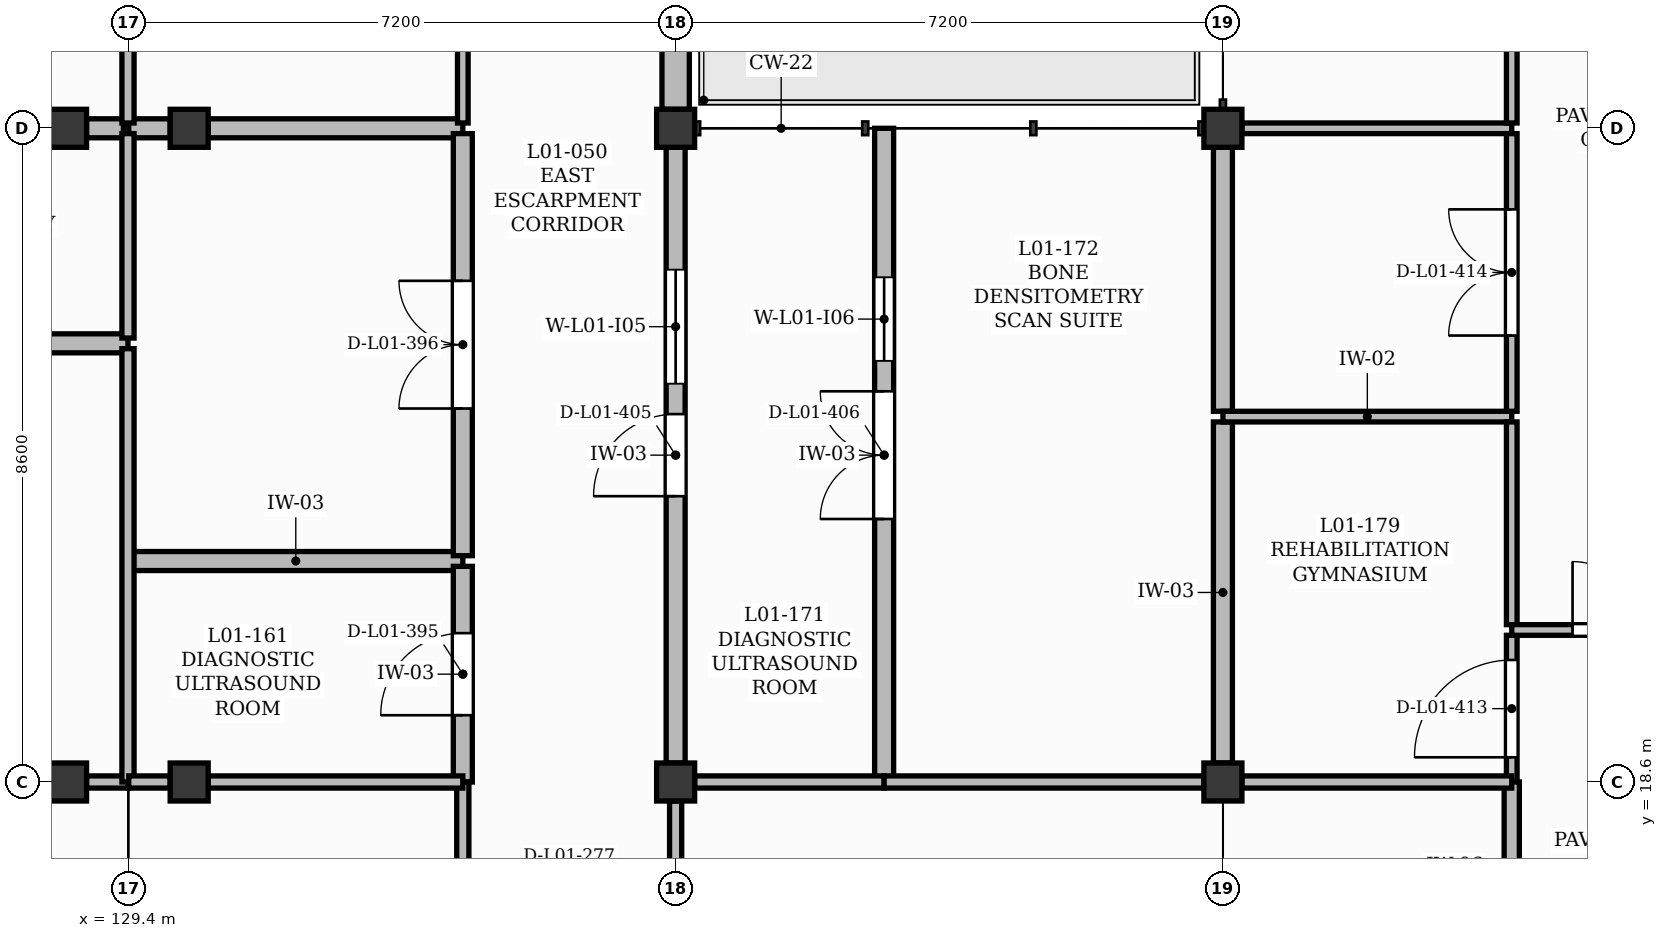
"""IFC4 building model, lengths in metres.
Left out: names, types, materials, properties, quantities, classifications, styles, units other than length and angle.
Written with IfcOpenShell. Run it as: python <this file> out.ifc"""

import sys

from ifc_helpers import new_model, si_unit, direction, frame, frame_2d, origin, origin_2d, place, context, subcontext, project, spatial, rectangle, extrude, element, fill, save


model = new_model("IFC4")
c1 = context("Model", 3, precision=1e-05, world=origin(), true_north=direction((0.0, 1.0)))
c2 = subcontext(c1, "Body", "Model", "MODEL_VIEW")
j1 = project(units=[si_unit("LENGTHUNIT", "METRE"), si_unit("PLANEANGLEUNIT", "RADIAN")], contexts=[c1])
p1 = place(None, origin())
s1 = spatial("IfcSite", under=j1, at=p1, CompositionType="ELEMENT")
p2 = place(p1, origin())
s2 = spatial("IfcBuilding", under=s1, at=p2, CompositionType="ELEMENT")
p3 = place(p2, frame((0.0, 0.0, 4.5)))
s3 = spatial("IfcBuildingStorey", under=s2, at=p3, CompositionType="ELEMENT", Elevation=4.5)
for number, where, z_axis, x_axis in (
    (1, (128.6, 18.6, 0.0), (0.0, 0.0, 1.0), (1.0, 0.0, 0.0)),
    (2, (128.6, 27.2, 0.0), (0.0, 0.0, 1.0), (1.0, 0.0, 0.0)),
    (3, (130.2, 18.6, 0.0), (0.0, 0.0, 1.0), (1.0, 0.0, 0.0)),
    (4, (130.2, 27.2, 0.0), (0.0, 0.0, 1.0), (1.0, 0.0, 0.0)),
    (5, (136.6, 18.6, 0.0), (0.0, 0.0, 1.0), (1.0, 0.0, 0.0)),
    (6, (136.6, 27.2, 0.0), (0.0, 0.0, 1.0), (1.0, 0.0, 0.0)),
    (7, (143.8, 18.6, 0.0), (0.0, 0.0, 1.0), (1.0, 0.0, 0.0)),
    (8, (143.8, 27.2, 0.0), (0.0, 0.0, 1.0), (1.0, 0.0, 0.0)),
):
    element("IfcColumn", number, at=place(p3, frame(where, z_axis=z_axis, x_axis=x_axis)), inside=s3, PredefinedType="COLUMN", context=c2, shape_type="SweptSolid", body=[
        extrude(rectangle(XDim=0.5, YDim=0.5, at=origin_2d()), origin(), (0.0, 0.0, 1.0), 4.22),
    ])
p4 = place(p3, frame((136.6, 27.45, 0.0), z_axis=(0.0, 0.0, 1.0), x_axis=(0.0, 1.0, 0.0)))
e9 = element("IfcWall", 9, at=p4, inside=s3, PredefinedType="SOLIDWALL", context=c2, shape_type="SweptSolid", body=[
    extrude(rectangle(XDim=9.1, YDim=0.36, at=frame_2d((4.55, 0.0))), origin(), (0.0, 0.0, 1.0), 3.52),
])
p5 = place(p4, frame((3.45, 0.0, 0.0)))
e10 = element("IfcOpeningElement", 10, at=p5, cuts=e9, PredefinedType="OPENING", context=c2, shape_type="SweptSolid", body=[
    extrude(rectangle(XDim=2.2, YDim=2.5, at=frame_2d((1.1, 1.25))), frame((0.0, 0.19, 0.0), z_axis=(0.0, -1.0, 0.0), x_axis=(1.0, 0.0, 0.0)), (0.0, 0.0, 1.0), 0.38),
])
p6 = place(p4, frame((0.915, 0.0, 1.5)))
e11 = element("IfcOpeningElement", 11, at=p6, cuts=e9, PredefinedType="OPENING", context=c2, shape_type="SweptSolid", body=[
    extrude(rectangle(XDim=1.68, YDim=1.25, at=frame_2d((0.84, 0.625))), frame((0.0, 0.19, 0.0), z_axis=(0.0, -1.0, 0.0), x_axis=(1.0, 0.0, 0.0)), (0.0, 0.0, 1.0), 0.38),
])
p7 = place(p4, frame((6.42, 0.0, 1.5)))
e12 = element("IfcOpeningElement", 12, at=p7, cuts=e9, PredefinedType="OPENING", context=c2, shape_type="SweptSolid", body=[
    extrude(rectangle(XDim=1.85, YDim=1.25, at=frame_2d((0.925, 0.625))), frame((0.0, 0.19, 0.0), z_axis=(0.0, -1.0, 0.0), x_axis=(1.0, 0.0, 0.0)), (0.0, 0.0, 1.0), 0.38),
])
p8 = place(p3, frame((124.6, 24.371, 0.0), z_axis=(0.0, 0.0, 1.0), x_axis=(1.0, 0.0, 0.0)))
e13 = element("IfcWall", 13, at=p8, inside=s3, PredefinedType="SOLIDWALL", context=c2, shape_type="SweptSolid", body=[
    extrude(rectangle(XDim=4.795, YDim=0.25, at=frame_2d((2.397, 0.0))), origin(), (0.0, 0.0, 1.0), 4.18),
])
p9 = place(p3, frame((128.85, 27.2, 0.0), z_axis=(0.0, 0.0, 1.0), x_axis=(1.0, 0.0, 0.0)))
e14 = element("IfcWall", 14, at=p9, inside=s3, PredefinedType="SOLIDWALL", context=c2, shape_type="SweptSolid", body=[
    extrude(rectangle(XDim=0.485, YDim=0.25, at=frame_2d((0.242, 0.0))), origin(), (0.0, 0.0, 1.0), 4.18),
])
p10 = place(p3, frame((129.405, 21.507, 0.0), z_axis=(0.0, 0.0, 1.0), x_axis=(1.0, 0.0, 0.0)))
e15 = element("IfcWall", 15, at=p10, inside=s3, PredefinedType="SOLIDWALL", context=c2, shape_type="SweptSolid", body=[
    extrude(rectangle(XDim=4.395, YDim=0.25, at=frame_2d((2.198, 0.0))), origin(), (0.0, 0.0, 1.0), 4.18),
])
p11 = place(p3, frame((129.405, 27.2, 0.0), z_axis=(0.0, 0.0, 1.0), x_axis=(1.0, 0.0, 0.0)))
e16 = element("IfcWall", 16, at=p11, inside=s3, PredefinedType="SOLIDWALL", context=c2, shape_type="SweptSolid", body=[
    extrude(rectangle(XDim=0.545, YDim=0.25, at=frame_2d((0.272, 0.0))), origin(), (0.0, 0.0, 1.0), 4.18),
])
p12 = place(p3, frame((130.45, 27.2, 0.0), z_axis=(0.0, 0.0, 1.0), x_axis=(1.0, 0.0, 0.0)))
e17 = element("IfcWall", 17, at=p12, inside=s3, PredefinedType="SOLIDWALL", context=c2, shape_type="SweptSolid", body=[
    extrude(rectangle(XDim=3.35, YDim=0.25, at=frame_2d((1.675, 0.0))), origin(), (0.0, 0.0, 1.0), 3.52),
])
p13 = place(p3, frame((133.8, 18.6, 0.0), z_axis=(0.0, 0.0, 1.0), x_axis=(0.0, 1.0, 0.0)))
e18 = element("IfcWall", 18, at=p13, inside=s3, PredefinedType="SOLIDWALL", context=c2, shape_type="SweptSolid", body=[
    extrude(rectangle(XDim=2.837, YDim=0.25, at=frame_2d((1.418, 0.0))), origin(), (0.0, 0.0, 1.0), 4.18),
])
p14 = place(p13, frame((0.878, 0.0, 0.0)))
e19 = element("IfcOpeningElement", 19, at=p14, cuts=e18, PredefinedType="OPENING", context=c2, shape_type="SweptSolid", body=[
    extrude(rectangle(XDim=1.08, YDim=2.15, at=frame_2d((0.54, 1.075))), frame((0.0, 0.135, 0.0), z_axis=(0.0, -1.0, 0.0), x_axis=(1.0, 0.0, 0.0)), (0.0, 0.0, 1.0), 0.27),
])
p15 = place(p3, frame((133.8, 21.577, 0.0), z_axis=(0.0, 0.0, 1.0), x_axis=(0.0, 1.0, 0.0)))
e20 = element("IfcWall", 20, at=p15, inside=s3, PredefinedType="SOLIDWALL", context=c2, shape_type="SweptSolid", body=[
    extrude(rectangle(XDim=5.553, YDim=0.25, at=frame_2d((2.776, 0.0))), origin(), (0.0, 0.0, 1.0), 4.18),
])
p16 = place(p15, frame((1.937, 0.0, 0.0)))
e21 = element("IfcOpeningElement", 21, at=p16, cuts=e20, PredefinedType="OPENING", context=c2, shape_type="SweptSolid", body=[
    extrude(rectangle(XDim=1.68, YDim=2.3, at=frame_2d((0.84, 1.15))), frame((0.0, 0.135, 0.0), z_axis=(0.0, -1.0, 0.0), x_axis=(1.0, 0.0, 0.0)), (0.0, 0.0, 1.0), 0.27),
])
p17 = place(p3, frame((133.8, 27.27, 0.0), z_axis=(0.0, 0.0, 1.0), x_axis=(0.0, 1.0, 0.0)))
e22 = element("IfcWall", 22, at=p17, inside=s3, PredefinedType="PARTITIONING", context=c2, shape_type="SweptSolid", body=[
    extrude(rectangle(XDim=3.681, YDim=0.14, at=frame_2d((1.84, 0.0))), origin(), (0.0, 0.0, 1.0), 4.18),
])
p18 = place(p17, frame((1.381, 0.0, 0.0)))
e23 = element("IfcOpeningElement", 23, at=p18, cuts=e22, PredefinedType="OPENING", context=c2, shape_type="SweptSolid", body=[
    extrude(rectangle(XDim=0.92, YDim=2.1, at=frame_2d((0.46, 1.05))), frame((0.0, 0.08, 0.0), z_axis=(0.0, -1.0, 0.0), x_axis=(1.0, 0.0, 0.0)), (0.0, 0.0, 1.0), 0.16),
])
p19 = place(p3, frame((136.6, 18.85, 0.0), z_axis=(0.0, 0.0, 1.0), x_axis=(0.0, 1.0, 0.0)))
e24 = element("IfcWall", 24, at=p19, inside=s3, PredefinedType="SOLIDWALL", context=c2, shape_type="SweptSolid", body=[
    extrude(rectangle(XDim=8.1, YDim=0.25, at=frame_2d((4.05, 0.0))), origin(), (0.0, 0.0, 1.0), 3.52),
])
p20 = place(p19, frame((3.51, 0.0, 0.0)))
e25 = element("IfcOpeningElement", 25, at=p20, cuts=e24, PredefinedType="OPENING", context=c2, shape_type="SweptSolid", body=[
    extrude(rectangle(XDim=1.08, YDim=2.15, at=frame_2d((0.54, 1.075))), frame((0.0, 0.135, 0.0), z_axis=(0.0, -1.0, 0.0), x_axis=(1.0, 0.0, 0.0)), (0.0, 0.0, 1.0), 0.27),
])
p21 = place(p19, frame((4.99, 0.0, 1.1)))
e26 = element("IfcOpeningElement", 26, at=p21, cuts=e24, PredefinedType="OPENING", context=c2, shape_type="SweptSolid", body=[
    extrude(rectangle(XDim=1.5, YDim=1.0, at=frame_2d((0.75, 0.5))), frame((0.0, 0.135, 0.0), z_axis=(0.0, -1.0, 0.0), x_axis=(1.0, 0.0, 0.0)), (0.0, 0.0, 1.0), 0.27),
])
p22 = place(p3, frame((139.343, 18.6, 0.0), z_axis=(0.0, 0.0, 1.0), x_axis=(0.0, 1.0, 0.0)))
e27 = element("IfcWall", 27, at=p22, inside=s3, PredefinedType="SOLIDWALL", context=c2, shape_type="SweptSolid", body=[
    extrude(rectangle(XDim=8.6, YDim=0.25, at=frame_2d((4.3, 0.0))), origin(), (0.0, 0.0, 1.0), 4.18),
])
p23 = place(p22, frame((3.46, 0.0, 0.0)))
e28 = element("IfcOpeningElement", 28, at=p23, cuts=e27, PredefinedType="OPENING", context=c2, shape_type="SweptSolid", body=[
    extrude(rectangle(XDim=1.68, YDim=2.3, at=frame_2d((0.84, 1.15))), frame((0.0, 0.135, 0.0), z_axis=(0.0, -1.0, 0.0), x_axis=(1.0, 0.0, 0.0)), (0.0, 0.0, 1.0), 0.27),
])
p24 = place(p22, frame((5.54, 0.0, 1.1)))
e29 = element("IfcOpeningElement", 29, at=p24, cuts=e27, PredefinedType="OPENING", context=c2, shape_type="SweptSolid", body=[
    extrude(rectangle(XDim=1.1, YDim=1.05, at=frame_2d((0.55, 0.525))), frame((0.0, 0.135, 0.0), z_axis=(0.0, -1.0, 0.0), x_axis=(1.0, 0.0, 0.0)), (0.0, 0.0, 1.0), 0.27),
])
p25 = place(p3, frame((143.8, 18.85, 0.0), z_axis=(0.0, 0.0, 1.0), x_axis=(0.0, 1.0, 0.0)))
e30 = element("IfcWall", 30, at=p25, inside=s3, PredefinedType="SOLIDWALL", context=c2, shape_type="SweptSolid", body=[
    extrude(rectangle(XDim=4.487, YDim=0.25, at=frame_2d((2.243, 0.0))), origin(), (0.0, 0.0, 1.0), 3.52),
])
p26 = place(p3, frame((143.8, 23.477, 0.0), z_axis=(0.0, 0.0, 1.0), x_axis=(0.0, 1.0, 0.0)))
e31 = element("IfcWall", 31, at=p26, inside=s3, PredefinedType="SOLIDWALL", context=c2, shape_type="SweptSolid", body=[
    extrude(rectangle(XDim=3.473, YDim=0.25, at=frame_2d((1.736, 0.0))), origin(), (0.0, 0.0, 1.0), 3.52),
])
p27 = place(p3, frame((143.8, 23.407, 0.0), z_axis=(0.0, 0.0, 1.0), x_axis=(1.0, 0.0, 0.0)))
e32 = element("IfcWall", 32, at=p27, inside=s3, PredefinedType="PARTITIONING", context=c2, shape_type="SweptSolid", body=[
    extrude(rectangle(XDim=3.8, YDim=0.14, at=frame_2d((1.9, 0.0))), origin(), (0.0, 0.0, 1.0), 4.18),
])
p28 = place(p3, frame((144.05, 27.2, 0.0), z_axis=(0.0, 0.0, 1.0), x_axis=(1.0, 0.0, 0.0)))
e33 = element("IfcWall", 33, at=p28, inside=s3, PredefinedType="PARTITIONING", context=c2, shape_type="SweptSolid", body=[
    extrude(rectangle(XDim=3.55, YDim=0.14, at=frame_2d((1.775, 0.0))), origin(), (0.0, 0.0, 1.0), 3.62),
])
p29 = place(p3, frame((147.6, 18.6, 0.0), z_axis=(0.0, 0.0, 1.0), x_axis=(0.0, 1.0, 0.0)))
e34 = element("IfcWall", 34, at=p29, inside=s3, PredefinedType="PARTITIONING", context=c2, shape_type="SweptSolid", body=[
    extrude(rectangle(XDim=1.93, YDim=0.14, at=frame_2d((0.965, 0.0))), origin(), (0.0, 0.0, 1.0), 4.18),
])
p30 = place(p29, frame((0.325, 0.0, 0.0)))
e35 = element("IfcOpeningElement", 35, at=p30, cuts=e34, PredefinedType="OPENING", context=c2, shape_type="SweptSolid", body=[
    extrude(rectangle(XDim=1.28, YDim=2.2, at=frame_2d((0.64, 1.1))), frame((0.0, 0.08, 0.0), z_axis=(0.0, -1.0, 0.0), x_axis=(1.0, 0.0, 0.0)), (0.0, 0.0, 1.0), 0.16),
])
p31 = place(p3, frame((147.6, 20.67, 0.0), z_axis=(0.0, 0.0, 1.0), x_axis=(0.0, 1.0, 0.0)))
e36 = element("IfcWall", 36, at=p31, inside=s3, PredefinedType="PARTITIONING", context=c2, shape_type="SweptSolid", body=[
    extrude(rectangle(XDim=2.667, YDim=0.14, at=frame_2d((1.333, 0.0))), origin(), (0.0, 0.0, 1.0), 4.18),
])
p32 = place(p3, frame((147.6, 20.6, 0.0), z_axis=(0.0, 0.0, 1.0), x_axis=(1.0, 0.0, 0.0)))
e37 = element("IfcWall", 37, at=p32, inside=s3, PredefinedType="PARTITIONING", context=c2, shape_type="SweptSolid", body=[
    extrude(rectangle(XDim=3.4, YDim=0.14, at=frame_2d((1.7, 0.0))), origin(), (0.0, 0.0, 1.0), 4.18),
])
p33 = place(p32, frame((0.8, 0.0, 0.0)))
e38 = element("IfcOpeningElement", 38, at=p33, cuts=e37, PredefinedType="OPENING", context=c2, shape_type="SweptSolid", body=[
    extrude(rectangle(XDim=1.8, YDim=2.3, at=frame_2d((0.9, 1.15))), frame((0.0, 0.08, 0.0), z_axis=(0.0, -1.0, 0.0), x_axis=(1.0, 0.0, 0.0)), (0.0, 0.0, 1.0), 0.16),
])
p34 = place(p3, frame((147.6, 23.477, 0.0), z_axis=(0.0, 0.0, 1.0), x_axis=(0.0, 1.0, 0.0)))
e39 = element("IfcWall", 39, at=p34, inside=s3, PredefinedType="PARTITIONING", context=c2, shape_type="SweptSolid", body=[
    extrude(rectangle(XDim=3.653, YDim=0.14, at=frame_2d((1.826, 0.0))), origin(), (0.0, 0.0, 1.0), 4.18),
])
p35 = place(p34, frame((0.997, 0.0, 0.0)))
e40 = element("IfcOpeningElement", 40, at=p35, cuts=e39, PredefinedType="OPENING", context=c2, shape_type="SweptSolid", body=[
    extrude(rectangle(XDim=1.66, YDim=2.3, at=frame_2d((0.83, 1.15))), frame((0.0, 0.08, 0.0), z_axis=(0.0, -1.0, 0.0), x_axis=(1.0, 0.0, 0.0)), (0.0, 0.0, 1.0), 0.16),
])
p36 = place(p3, frame((147.6, 27.27, 0.0), z_axis=(0.0, 0.0, 1.0), x_axis=(0.0, 1.0, 0.0)))
e41 = element("IfcWall", 41, at=p36, inside=s3, PredefinedType="PARTITIONING", context=c2, shape_type="SweptSolid", body=[
    extrude(rectangle(XDim=4.334, YDim=0.14, at=frame_2d((2.167, 0.0))), origin(), (0.0, 0.0, 1.0), 4.18),
])
p37 = place(p36, frame((1.527, 0.0, 0.0)))
e42 = element("IfcOpeningElement", 42, at=p37, cuts=e41, PredefinedType="OPENING", context=c2, shape_type="SweptSolid", body=[
    extrude(rectangle(XDim=1.28, YDim=2.2, at=frame_2d((0.64, 1.1))), frame((0.0, 0.08, 0.0), z_axis=(0.0, -1.0, 0.0), x_axis=(1.0, 0.0, 0.0)), (0.0, 0.0, 1.0), 0.16),
])
p38 = place(p3, frame((147.6, 16.4, 0.0), z_axis=(0.0, 0.0, 1.0), x_axis=(0.0, 1.0, 0.0)))
e43 = element("IfcWall", 43, at=p38, inside=s3, PredefinedType="PARTITIONING", context=c2, shape_type="SweptSolid", body=[
    extrude(rectangle(XDim=2.2, YDim=0.2, at=frame_2d((1.1, 0.0))), origin(), (0.0, 0.0, 1.0), 4.18),
])
p39 = place(p3, frame((136.6, 16.47, 0.0), z_axis=(0.0, 0.0, 1.0), x_axis=(0.0, 1.0, 0.0)))
e44 = element("IfcWall", 44, at=p39, inside=s3, PredefinedType="PARTITIONING", context=c2, shape_type="SweptSolid", body=[
    extrude(rectangle(XDim=1.88, YDim=0.16, at=frame_2d((0.94, 0.0))), origin(), (0.0, 0.0, 1.0), 3.52),
])
p40 = place(p3, frame((133.8, 16.47, 0.0), z_axis=(0.0, 0.0, 1.0), x_axis=(0.0, 1.0, 0.0)))
e45 = element("IfcWall", 45, at=p40, inside=s3, PredefinedType="PARTITIONING", context=c2, shape_type="SweptSolid", body=[
    extrude(rectangle(XDim=2.13, YDim=0.16, at=frame_2d((1.065, 0.0))), origin(), (0.0, 0.0, 1.0), 4.18),
])
p41 = place(p3, frame((128.85, 18.6, 0.0), z_axis=(0.0, 0.0, 1.0), x_axis=(1.0, 0.0, 0.0)))
e46 = element("IfcWall", 46, at=p41, inside=s3, PredefinedType="PARTITIONING", context=c2, shape_type="SweptSolid", body=[
    extrude(rectangle(XDim=0.545, YDim=0.16, at=frame_2d((0.272, 0.0))), origin(), (0.0, 0.0, 1.0), 4.18),
])
p42 = place(p3, frame((129.395, 18.6, 0.0), z_axis=(0.0, 0.0, 1.0), x_axis=(0.0, 1.0, 0.0)))
e47 = element("IfcWall", 47, at=p42, inside=s3, PredefinedType="PARTITIONING", context=c2, shape_type="SweptSolid", body=[
    extrude(rectangle(XDim=5.7, YDim=0.16, at=frame_2d((2.85, 0.0))), origin(), (0.0, 0.0, 1.0), 4.18),
])
p43 = place(p3, frame((129.395, 24.441, 0.0), z_axis=(0.0, 0.0, 1.0), x_axis=(0.0, 1.0, 0.0)))
e48 = element("IfcWall", 48, at=p43, inside=s3, PredefinedType="PARTITIONING", context=c2, shape_type="SweptSolid", body=[
    extrude(rectangle(XDim=2.689, YDim=0.16, at=frame_2d((1.345, 0.0))), origin(), (0.0, 0.0, 1.0), 4.18),
])
p44 = place(p3, frame((129.395, 27.27, 0.0), z_axis=(0.0, 0.0, 1.0), x_axis=(0.0, 1.0, 0.0)))
e49 = element("IfcWall", 49, at=p44, inside=s3, PredefinedType="PARTITIONING", context=c2, shape_type="SweptSolid", body=[
    extrude(rectangle(XDim=3.354, YDim=0.16, at=frame_2d((1.677, 0.0))), origin(), (0.0, 0.0, 1.0), 4.18),
])
p45 = place(p3, frame((129.405, 18.6, 0.0), z_axis=(0.0, 0.0, 1.0), x_axis=(1.0, 0.0, 0.0)))
e50 = element("IfcWall", 50, at=p45, inside=s3, PredefinedType="PARTITIONING", context=c2, shape_type="SweptSolid", body=[
    extrude(rectangle(XDim=0.545, YDim=0.16, at=frame_2d((0.272, 0.0))), origin(), (0.0, 0.0, 1.0), 4.18),
])
p46 = place(p3, frame((130.45, 18.6, 0.0), z_axis=(0.0, 0.0, 1.0), x_axis=(1.0, 0.0, 0.0)))
e51 = element("IfcWall", 51, at=p46, inside=s3, PredefinedType="PARTITIONING", context=c2, shape_type="SweptSolid", body=[
    extrude(rectangle(XDim=3.35, YDim=0.16, at=frame_2d((1.675, 0.0))), origin(), (0.0, 0.0, 1.0), 3.52),
])
p47 = place(p3, frame((136.85, 18.6, 0.0), z_axis=(0.0, 0.0, 1.0), x_axis=(1.0, 0.0, 0.0)))
e52 = element("IfcWall", 52, at=p47, inside=s3, PredefinedType="PARTITIONING", context=c2, shape_type="SweptSolid", body=[
    extrude(rectangle(XDim=2.493, YDim=0.16, at=frame_2d((1.247, 0.0))), origin(), (0.0, 0.0, 1.0), 3.52),
])
p48 = place(p3, frame((139.343, 18.6, 0.0), z_axis=(0.0, 0.0, 1.0), x_axis=(1.0, 0.0, 0.0)))
e53 = element("IfcWall", 53, at=p48, inside=s3, PredefinedType="PARTITIONING", context=c2, shape_type="SweptSolid", body=[
    extrude(rectangle(XDim=4.207, YDim=0.16, at=frame_2d((2.104, 0.0))), origin(), (0.0, 0.0, 1.0), 3.52),
])
p49 = place(p3, frame((144.05, 18.6, 0.0), z_axis=(0.0, 0.0, 1.0), x_axis=(1.0, 0.0, 0.0)))
e54 = element("IfcWall", 54, at=p49, inside=s3, PredefinedType="PARTITIONING", context=c2, shape_type="SweptSolid", body=[
    extrude(rectangle(XDim=3.55, YDim=0.16, at=frame_2d((1.775, 0.0))), origin(), (0.0, 0.0, 1.0), 3.58),
])
p50 = place(p33, origin())
e55 = element("IfcDoor", 55, at=p50, inside=s3, OperationType="DOUBLE_DOOR_SINGLE_SWING", PredefinedType="DOOR", context=c2, shape_type="SweptSolid", body=[
    extrude(rectangle(XDim=1.8, YDim=2.3, at=frame_2d((0.9, 1.15))), frame((0.0, 0.025, 0.0), z_axis=(0.0, -1.0, 0.0), x_axis=(1.0, 0.0, 0.0)), (0.0, 0.0, 1.0), 0.05),
])
fill(e38, e55)
p51 = place(p14, origin())
e56 = element("IfcDoor", 56, at=p51, inside=s3, OperationType="SINGLE_SWING_LEFT", PredefinedType="DOOR", context=c2, shape_type="SweptSolid", body=[
    extrude(rectangle(XDim=1.08, YDim=2.15, at=frame_2d((0.54, 1.075))), frame((0.0, 0.025, 0.0), z_axis=(0.0, -1.0, 0.0), x_axis=(1.0, 0.0, 0.0)), (0.0, 0.0, 1.0), 0.05),
])
fill(e19, e56)
p52 = place(p16, origin())
e57 = element("IfcDoor", 57, at=p52, inside=s3, OperationType="DOUBLE_DOOR_SINGLE_SWING", PredefinedType="DOOR", context=c2, shape_type="SweptSolid", body=[
    extrude(rectangle(XDim=1.68, YDim=2.3, at=frame_2d((0.84, 1.15))), frame((0.0, 0.025, 0.0), z_axis=(0.0, -1.0, 0.0), x_axis=(1.0, 0.0, 0.0)), (0.0, 0.0, 1.0), 0.05),
])
fill(e21, e57)
p53 = place(p20, origin())
e58 = element("IfcDoor", 58, at=p53, inside=s3, OperationType="SINGLE_SWING_LEFT", PredefinedType="DOOR", context=c2, shape_type="SweptSolid", body=[
    extrude(rectangle(XDim=1.08, YDim=2.15, at=frame_2d((0.54, 1.075))), frame((0.0, 0.025, 0.0), z_axis=(0.0, -1.0, 0.0), x_axis=(1.0, 0.0, 0.0)), (0.0, 0.0, 1.0), 0.05),
])
fill(e25, e58)
p54 = place(p21, origin())
e59 = element("IfcWindow", 59, at=p54, inside=s3, PartitioningType="SINGLE_PANEL", PredefinedType="WINDOW", context=c2, shape_type="SweptSolid", body=[
    extrude(rectangle(XDim=1.5, YDim=1.0, at=frame_2d((0.75, 0.5))), frame((0.0, 0.03, 0.0), z_axis=(0.0, -1.0, 0.0), x_axis=(1.0, 0.0, 0.0)), (0.0, 0.0, 1.0), 0.06),
])
fill(e26, e59)
p55 = place(p23, origin())
e60 = element("IfcDoor", 60, at=p55, inside=s3, OperationType="DOUBLE_DOOR_SINGLE_SWING", PredefinedType="DOOR", context=c2, shape_type="SweptSolid", body=[
    extrude(rectangle(XDim=1.68, YDim=2.3, at=frame_2d((0.84, 1.15))), frame((0.0, 0.025, 0.0), z_axis=(0.0, -1.0, 0.0), x_axis=(1.0, 0.0, 0.0)), (0.0, 0.0, 1.0), 0.05),
])
fill(e28, e60)
p56 = place(p24, origin())
e61 = element("IfcWindow", 61, at=p56, inside=s3, PartitioningType="SINGLE_PANEL", PredefinedType="WINDOW", context=c2, shape_type="SweptSolid", body=[
    extrude(rectangle(XDim=1.1, YDim=1.05, at=frame_2d((0.55, 0.525))), frame((0.0, 0.03, 0.0), z_axis=(0.0, -1.0, 0.0), x_axis=(1.0, 0.0, 0.0)), (0.0, 0.0, 1.0), 0.06),
])
fill(e29, e61)
p57 = place(p30, origin())
e62 = element("IfcDoor", 62, at=p57, inside=s3, OperationType="SINGLE_SWING_LEFT", PredefinedType="DOOR", context=c2, shape_type="SweptSolid", body=[
    extrude(rectangle(XDim=1.28, YDim=2.2, at=frame_2d((0.64, 1.1))), frame((0.0, 0.025, 0.0), z_axis=(0.0, -1.0, 0.0), x_axis=(1.0, 0.0, 0.0)), (0.0, 0.0, 1.0), 0.05),
])
fill(e35, e62)
p58 = place(p35, origin())
e63 = element("IfcDoor", 63, at=p58, inside=s3, OperationType="DOUBLE_DOOR_SINGLE_SWING", PredefinedType="DOOR", context=c2, shape_type="SweptSolid", body=[
    extrude(rectangle(XDim=1.66, YDim=2.3, at=frame_2d((0.83, 1.15))), frame((0.0, 0.025, 0.0), z_axis=(0.0, -1.0, 0.0), x_axis=(1.0, 0.0, 0.0)), (0.0, 0.0, 1.0), 0.05),
])
fill(e40, e63)
save(model, sys.argv[1])
